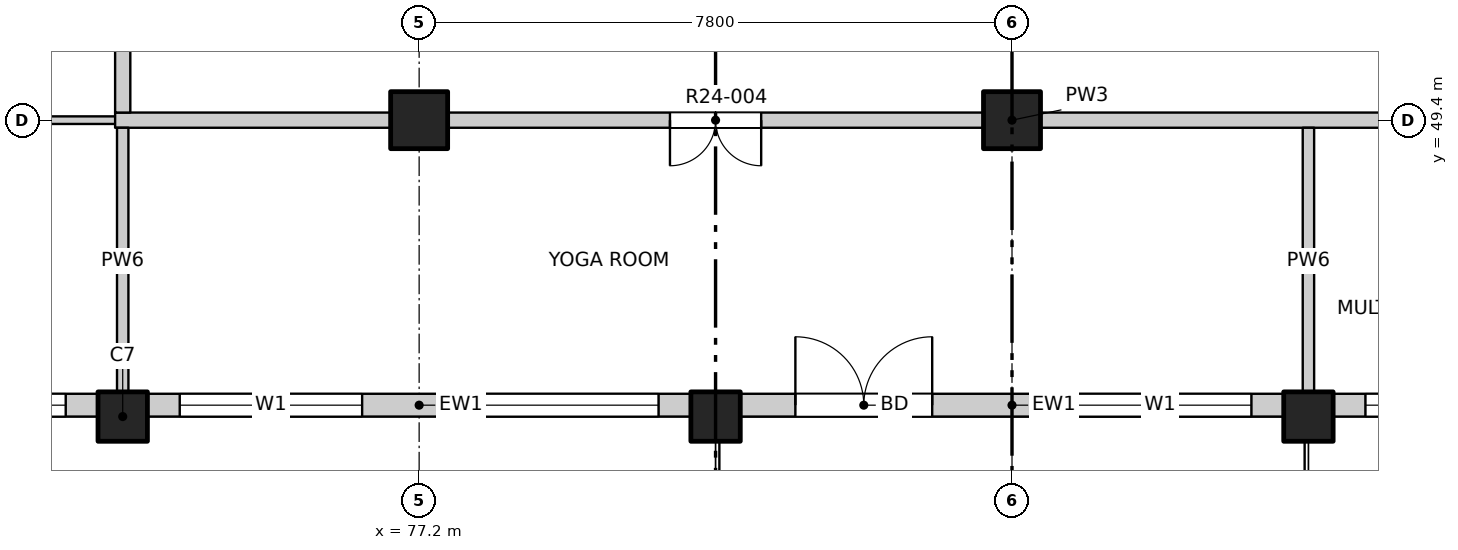
"""IFC4 building model, lengths in metres.
Left out: names, types, materials, properties, quantities, classifications, styles, units other than length and angle.
Written with IfcOpenShell. Run it as: python <this file> out.ifc"""

import sys

from ifc_helpers import new_model, si_unit, direction, frame, frame_2d, origin, origin_2d, place, context, subcontext, project, spatial, rectangle, extrude, element, fill, save


model = new_model("IFC4")
c1 = context("Model", 3, precision=1e-05, world=origin(), true_north=direction((0.0, 1.0)))
c2 = subcontext(c1, "Body", "Model", "MODEL_VIEW")
j1 = project(units=[si_unit("LENGTHUNIT", "METRE"), si_unit("PLANEANGLEUNIT", "RADIAN")], contexts=[c1])
p1 = place(None, origin())
s1 = spatial("IfcSite", under=j1, at=p1, CompositionType="ELEMENT")
p2 = place(p1, origin())
s2 = spatial("IfcBuilding", under=s1, at=p2, CompositionType="ELEMENT")
p3 = place(p2, frame((0.0, 0.0, 246.0)))
s3 = spatial("IfcBuildingStorey", under=s2, at=p3, CompositionType="ELEMENT", Elevation=246.0)
for number, where, z_axis, x_axis in (
    (1, (73.3, 45.5, -0.3), (0.0, 0.0, 1.0), (1.0, 0.0, 0.0)),
    (2, (81.1, 45.5, -0.3), (0.0, 0.0, 1.0), (1.0, 0.0, 0.0)),
    (3, (88.9, 45.5, -0.3), (0.0, 0.0, 1.0), (1.0, 0.0, 0.0)),
):
    element("IfcColumn", number, at=place(p3, frame(where, z_axis=z_axis, x_axis=x_axis)), inside=s3, PredefinedType="COLUMN", context=c2, shape_type="SweptSolid", body=[
        extrude(rectangle(XDim=0.65, YDim=0.65, at=origin_2d()), origin(), (0.0, 0.0, 1.0), 3.45),
    ])
for number, where, z_axis, x_axis in (
    (4, (77.2, 49.4, -0.3), (0.0, 0.0, 1.0), (1.0, 0.0, 0.0)),
    (5, (85.0, 49.4, -0.3), (0.0, 0.0, 1.0), (1.0, 0.0, 0.0)),
):
    element("IfcColumn", number, at=place(p3, frame(where, z_axis=z_axis, x_axis=x_axis)), inside=s3, PredefinedType="COLUMN", context=c2, shape_type="SweptSolid", body=[
        extrude(rectangle(XDim=0.75, YDim=0.75, at=origin_2d()), origin(), (0.0, 0.0, 1.0), 3.45),
    ])
p4 = place(p3, frame((69.4, 45.65, 0.0), z_axis=(0.0, 0.0, 1.0), x_axis=(1.0, 0.0, 0.0)))
e6 = element("IfcWall", 6, at=p4, inside=s3, PredefinedType="SOLIDWALL", context=c2, shape_type="SweptSolid", body=[
    extrude(rectangle(XDim=3.575, YDim=0.3, at=frame_2d((1.788, 0.0))), origin(), (0.0, 0.0, 1.0), 2.7),
])
p5 = place(p4, frame((0.75, 0.0, 0.9)))
e7 = element("IfcOpeningElement", 7, at=p5, cuts=e6, PredefinedType="OPENING", context=c2, shape_type="SweptSolid", body=[
    extrude(rectangle(XDim=2.4, YDim=1.8, at=frame_2d((1.2, 0.9))), frame((0.0, 0.16, 0.0), z_axis=(0.0, -1.0, 0.0), x_axis=(1.0, 0.0, 0.0)), (0.0, 0.0, 1.0), 0.32),
])
p6 = place(p3, frame((73.625, 45.65, 0.0), z_axis=(0.0, 0.0, 1.0), x_axis=(1.0, 0.0, 0.0)))
e8 = element("IfcWall", 8, at=p6, inside=s3, PredefinedType="SOLIDWALL", context=c2, shape_type="SweptSolid", body=[
    extrude(rectangle(XDim=7.15, YDim=0.3, at=frame_2d((3.575, 0.0))), origin(), (0.0, 0.0, 1.0), 2.7),
])
p7 = place(p6, frame((0.425, 0.0, 0.9)))
e9 = element("IfcOpeningElement", 9, at=p7, cuts=e8, PredefinedType="OPENING", context=c2, shape_type="SweptSolid", body=[
    extrude(rectangle(XDim=2.4, YDim=1.8, at=frame_2d((1.2, 0.9))), frame((0.0, 0.16, 0.0), z_axis=(0.0, -1.0, 0.0), x_axis=(1.0, 0.0, 0.0)), (0.0, 0.0, 1.0), 0.32),
])
p8 = place(p6, frame((4.325, 0.0, 0.9)))
e10 = element("IfcOpeningElement", 10, at=p8, cuts=e8, PredefinedType="OPENING", context=c2, shape_type="SweptSolid", body=[
    extrude(rectangle(XDim=2.4, YDim=1.8, at=frame_2d((1.2, 0.9))), frame((0.0, 0.16, 0.0), z_axis=(0.0, -1.0, 0.0), x_axis=(1.0, 0.0, 0.0)), (0.0, 0.0, 1.0), 0.32),
])
p9 = place(p3, frame((81.425, 45.65, 0.0), z_axis=(0.0, 0.0, 1.0), x_axis=(1.0, 0.0, 0.0)))
e11 = element("IfcWall", 11, at=p9, inside=s3, PredefinedType="SOLIDWALL", context=c2, shape_type="SweptSolid", body=[
    extrude(rectangle(XDim=7.15, YDim=0.3, at=frame_2d((3.575, 0.0))), origin(), (0.0, 0.0, 1.0), 2.7),
])
p10 = place(p9, frame((0.725, 0.0, 0.0)))
e12 = element("IfcOpeningElement", 12, at=p10, cuts=e11, PredefinedType="OPENING", context=c2, shape_type="SweptSolid", body=[
    extrude(rectangle(XDim=1.8, YDim=2.4, at=frame_2d((0.9, 1.2))), frame((0.0, 0.16, 0.0), z_axis=(0.0, -1.0, 0.0), x_axis=(1.0, 0.0, 0.0)), (0.0, 0.0, 1.0), 0.32),
])
p11 = place(p9, frame((4.325, 0.0, 0.9)))
e13 = element("IfcOpeningElement", 13, at=p11, cuts=e11, PredefinedType="OPENING", context=c2, shape_type="SweptSolid", body=[
    extrude(rectangle(XDim=2.4, YDim=1.8, at=frame_2d((1.2, 0.9))), frame((0.0, 0.16, 0.0), z_axis=(0.0, -1.0, 0.0), x_axis=(1.0, 0.0, 0.0)), (0.0, 0.0, 1.0), 0.32),
])
p12 = place(p3, frame((89.225, 45.65, 0.0), z_axis=(0.0, 0.0, 1.0), x_axis=(1.0, 0.0, 0.0)))
e14 = element("IfcWall", 14, at=p12, inside=s3, PredefinedType="SOLIDWALL", context=c2, shape_type="SweptSolid", body=[
    extrude(rectangle(XDim=7.15, YDim=0.3, at=frame_2d((3.575, 0.0))), origin(), (0.0, 0.0, 1.0), 2.7),
])
p13 = place(p12, frame((0.425, 0.0, 0.9)))
e15 = element("IfcOpeningElement", 15, at=p13, cuts=e14, PredefinedType="OPENING", context=c2, shape_type="SweptSolid", body=[
    extrude(rectangle(XDim=2.4, YDim=1.8, at=frame_2d((1.2, 0.9))), frame((0.0, 0.16, 0.0), z_axis=(0.0, -1.0, 0.0), x_axis=(1.0, 0.0, 0.0)), (0.0, 0.0, 1.0), 0.32),
])
p14 = place(p12, frame((4.325, 0.0, 0.9)))
e16 = element("IfcOpeningElement", 16, at=p14, cuts=e14, PredefinedType="OPENING", context=c2, shape_type="SweptSolid", body=[
    extrude(rectangle(XDim=2.4, YDim=1.8, at=frame_2d((1.2, 0.9))), frame((0.0, 0.16, 0.0), z_axis=(0.0, -1.0, 0.0), x_axis=(1.0, 0.0, 0.0)), (0.0, 0.0, 1.0), 0.32),
])
p15 = place(p3, frame((65.8, 49.4, 0.0), z_axis=(0.0, 0.0, 1.0), x_axis=(1.0, 0.0, 0.0)))
e17 = element("IfcWall", 17, at=p15, inside=s3, PredefinedType="PARTITIONING", context=c2, shape_type="SweptSolid", body=[
    extrude(rectangle(XDim=7.6, YDim=0.1, at=frame_2d((3.8, 0.0))), origin(), (0.0, 0.0, 1.0), 3.15),
])
p16 = place(p15, frame((4.09, 0.0, 0.0)))
e18 = element("IfcOpeningElement", 18, at=p16, cuts=e17, PredefinedType="OPENING", context=c2, shape_type="SweptSolid", body=[
    extrude(rectangle(XDim=0.9, YDim=2.1, at=frame_2d((0.45, 1.05))), frame((0.0, 0.06, 0.0), z_axis=(0.0, -1.0, 0.0), x_axis=(1.0, 0.0, 0.0)), (0.0, 0.0, 1.0), 0.12),
])
p17 = place(p3, frame((73.2, 49.4, 0.0), z_axis=(0.0, 0.0, 1.0), x_axis=(1.0, 0.0, 0.0)))
e19 = element("IfcWall", 19, at=p17, inside=s3, PredefinedType="PARTITIONING", context=c2, shape_type="SweptSolid", body=[
    extrude(rectangle(XDim=23.6, YDim=0.2, at=frame_2d((11.8, 0.0))), origin(), (0.0, 0.0, 1.0), 3.15),
])
p18 = place(p17, frame((7.3, 0.0, 0.0)))
e20 = element("IfcOpeningElement", 20, at=p18, cuts=e19, PredefinedType="OPENING", context=c2, shape_type="SweptSolid", body=[
    extrude(rectangle(XDim=1.2, YDim=2.1, at=frame_2d((0.6, 1.05))), frame((0.0, 0.11, 0.0), z_axis=(0.0, -1.0, 0.0), x_axis=(1.0, 0.0, 0.0)), (0.0, 0.0, 1.0), 0.22),
])
p19 = place(p17, frame((20.075, 0.0, 0.0)))
e21 = element("IfcOpeningElement", 21, at=p19, cuts=e19, PredefinedType="OPENING", context=c2, shape_type="SweptSolid", body=[
    extrude(rectangle(XDim=1.2, YDim=2.1, at=frame_2d((0.6, 1.05))), frame((0.0, 0.11, 0.0), z_axis=(0.0, -1.0, 0.0), x_axis=(1.0, 0.0, 0.0)), (0.0, 0.0, 1.0), 0.22),
])
p20 = place(p3, frame((73.3, 45.8, 0.0), z_axis=(0.0, 0.0, 1.0), x_axis=(0.0, 1.0, 0.0)))
e22 = element("IfcWall", 22, at=p20, inside=s3, PredefinedType="PARTITIONING", context=c2, shape_type="SweptSolid", body=[
    extrude(rectangle(XDim=3.5, YDim=0.15, at=frame_2d((1.75, 0.0))), origin(), (0.0, 0.0, 1.0), 3.15),
])
p21 = place(p3, frame((73.3, 49.5, 0.0), z_axis=(0.0, 0.0, 1.0), x_axis=(0.0, 1.0, 0.0)))
e23 = element("IfcWall", 23, at=p21, inside=s3, PredefinedType="PARTITIONING", context=c2, shape_type="SweptSolid", body=[
    extrude(rectangle(XDim=34.7, YDim=0.2, at=frame_2d((17.35, 0.0))), origin(), (0.0, 0.0, 1.0), 3.15),
])
p22 = place(p21, frame((3.325, 0.0, 0.0)))
e24 = element("IfcOpeningElement", 24, at=p22, cuts=e23, PredefinedType="OPENING", context=c2, shape_type="SweptSolid", body=[
    extrude(rectangle(XDim=1.0, YDim=2.1, at=frame_2d((0.5, 1.05))), frame((0.0, 0.11, 0.0), z_axis=(0.0, -1.0, 0.0), x_axis=(1.0, 0.0, 0.0)), (0.0, 0.0, 1.0), 0.22),
])
p23 = place(p21, frame((17.875, 0.0, 0.0)))
e25 = element("IfcOpeningElement", 25, at=p23, cuts=e23, PredefinedType="OPENING", context=c2, shape_type="SweptSolid", body=[
    extrude(rectangle(XDim=1.0, YDim=2.1, at=frame_2d((0.5, 1.05))), frame((0.0, 0.11, 0.0), z_axis=(0.0, -1.0, 0.0), x_axis=(1.0, 0.0, 0.0)), (0.0, 0.0, 1.0), 0.22),
])
p24 = place(p21, frame((25.775, 0.0, 0.0)))
e26 = element("IfcOpeningElement", 26, at=p24, cuts=e23, PredefinedType="OPENING", context=c2, shape_type="SweptSolid", body=[
    extrude(rectangle(XDim=1.0, YDim=2.1, at=frame_2d((0.5, 1.05))), frame((0.0, 0.11, 0.0), z_axis=(0.0, -1.0, 0.0), x_axis=(1.0, 0.0, 0.0)), (0.0, 0.0, 1.0), 0.22),
])
p25 = place(p3, frame((88.9, 45.8, 0.0), z_axis=(0.0, 0.0, 1.0), x_axis=(0.0, 1.0, 0.0)))
e27 = element("IfcWall", 27, at=p25, inside=s3, PredefinedType="PARTITIONING", context=c2, shape_type="SweptSolid", body=[
    extrude(rectangle(XDim=3.5, YDim=0.15, at=frame_2d((1.75, 0.0))), origin(), (0.0, 0.0, 1.0), 2.55),
])
p26 = place(p5, origin())
e28 = element("IfcWindow", 28, at=p26, inside=s3, PartitioningType="DOUBLE_PANEL_VERTICAL", PredefinedType="WINDOW", context=c2, shape_type="SweptSolid", body=[
    extrude(rectangle(XDim=2.4, YDim=1.8, at=frame_2d((1.2, 0.9))), frame((0.0, 0.03, 0.0), z_axis=(0.0, -1.0, 0.0), x_axis=(1.0, 0.0, 0.0)), (0.0, 0.0, 1.0), 0.06),
])
fill(e7, e28)
p27 = place(p7, origin())
e29 = element("IfcWindow", 29, at=p27, inside=s3, PartitioningType="DOUBLE_PANEL_VERTICAL", PredefinedType="WINDOW", context=c2, shape_type="SweptSolid", body=[
    extrude(rectangle(XDim=2.4, YDim=1.8, at=frame_2d((1.2, 0.9))), frame((0.0, 0.03, 0.0), z_axis=(0.0, -1.0, 0.0), x_axis=(1.0, 0.0, 0.0)), (0.0, 0.0, 1.0), 0.06),
])
fill(e9, e29)
p28 = place(p8, origin())
e30 = element("IfcWindow", 30, at=p28, inside=s3, PartitioningType="DOUBLE_PANEL_VERTICAL", PredefinedType="WINDOW", context=c2, shape_type="SweptSolid", body=[
    extrude(rectangle(XDim=2.4, YDim=1.8, at=frame_2d((1.2, 0.9))), frame((0.0, 0.03, 0.0), z_axis=(0.0, -1.0, 0.0), x_axis=(1.0, 0.0, 0.0)), (0.0, 0.0, 1.0), 0.06),
])
fill(e10, e30)
p29 = place(p10, origin())
e31 = element("IfcDoor", 31, at=p29, inside=s3, OperationType="DOUBLE_DOOR_SINGLE_SWING", PredefinedType="DOOR", context=c2, shape_type="SweptSolid", body=[
    extrude(rectangle(XDim=1.8, YDim=2.4, at=frame_2d((0.9, 1.2))), frame((0.0, 0.025, 0.0), z_axis=(0.0, -1.0, 0.0), x_axis=(1.0, 0.0, 0.0)), (0.0, 0.0, 1.0), 0.05),
])
fill(e12, e31)
p30 = place(p11, origin())
e32 = element("IfcWindow", 32, at=p30, inside=s3, PartitioningType="DOUBLE_PANEL_VERTICAL", PredefinedType="WINDOW", context=c2, shape_type="SweptSolid", body=[
    extrude(rectangle(XDim=2.4, YDim=1.8, at=frame_2d((1.2, 0.9))), frame((0.0, 0.03, 0.0), z_axis=(0.0, -1.0, 0.0), x_axis=(1.0, 0.0, 0.0)), (0.0, 0.0, 1.0), 0.06),
])
fill(e13, e32)
p31 = place(p13, origin())
e33 = element("IfcWindow", 33, at=p31, inside=s3, PartitioningType="DOUBLE_PANEL_VERTICAL", PredefinedType="WINDOW", context=c2, shape_type="SweptSolid", body=[
    extrude(rectangle(XDim=2.4, YDim=1.8, at=frame_2d((1.2, 0.9))), frame((0.0, 0.03, 0.0), z_axis=(0.0, -1.0, 0.0), x_axis=(1.0, 0.0, 0.0)), (0.0, 0.0, 1.0), 0.06),
])
fill(e15, e33)
p32 = place(p18, origin())
e34 = element("IfcDoor", 34, at=p32, inside=s3, OperationType="DOUBLE_DOOR_SINGLE_SWING", PredefinedType="DOOR", context=c2, shape_type="SweptSolid", body=[
    extrude(rectangle(XDim=1.2, YDim=2.1, at=frame_2d((0.6, 1.05))), frame((0.0, 0.025, 0.0), z_axis=(0.0, -1.0, 0.0), x_axis=(1.0, 0.0, 0.0)), (0.0, 0.0, 1.0), 0.05),
])
fill(e20, e34)
save(model, sys.argv[1])
